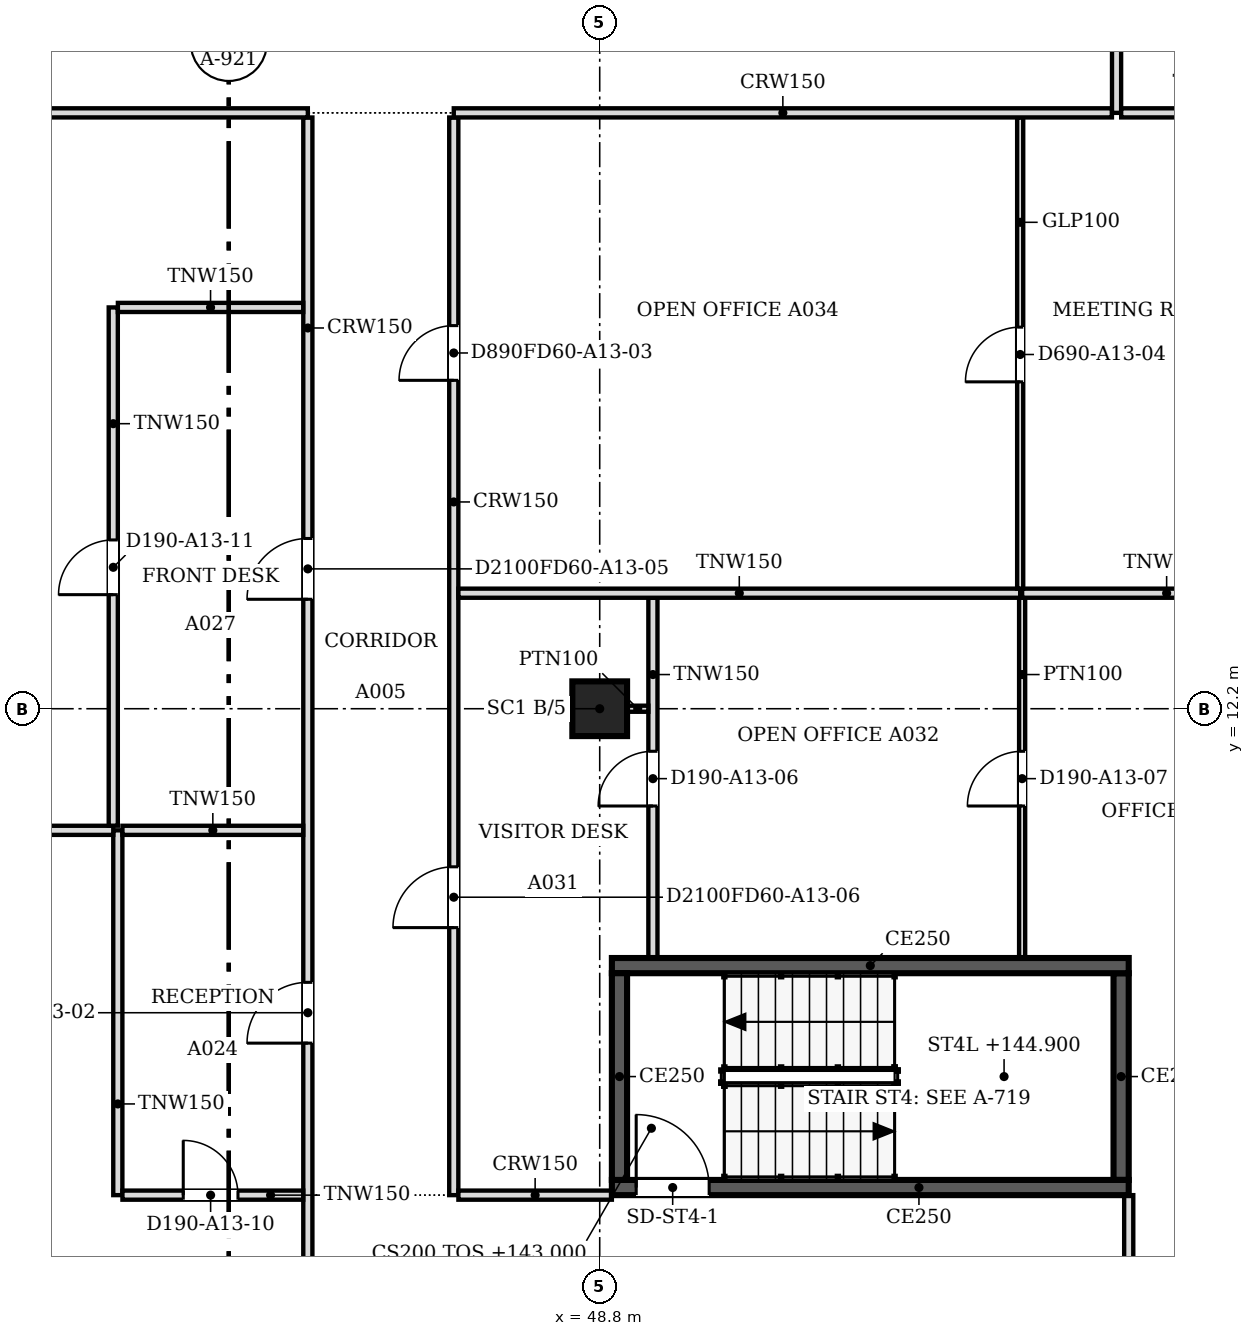
"""IFC4 building model, lengths in metres.
Left out: names, types, materials, properties, quantities, classifications, styles, units other than length and angle.
Written with IfcOpenShell. Run it as: python <this file> out.ifc"""

import sys

from ifc_helpers import new_model, si_unit, direction, frame, frame_2d, origin, origin_2d, place, context, subcontext, project, spatial, polyline, rectangle, outline, extrude, faceted_brep, source, transform, mapped, element, fill, save


model = new_model("IFC4")
c1 = context("Model", 3, precision=1e-05, world=origin(), true_north=direction((0.0, 1.0)))
c2 = subcontext(c1, "Body", "Model", "MODEL_VIEW")
j1 = project(units=[si_unit("LENGTHUNIT", "METRE"), si_unit("PLANEANGLEUNIT", "RADIAN")], contexts=[c1])
p1 = place(None, origin())
s1 = spatial("IfcSite", under=j1, at=p1, CompositionType="ELEMENT")
p2 = place(p1, origin())
s2 = spatial("IfcBuilding", under=s1, at=p2, CompositionType="ELEMENT")
p3 = place(p2, frame((0.0, 0.0, 143.0)))
s3 = spatial("IfcBuildingStorey", under=s2, at=p3, CompositionType="ELEMENT", Elevation=143.0)
p4 = place(p3, frame((48.8, 12.2, 0.0), z_axis=(0.0, 0.0, 1.0), x_axis=(1.0, 0.0, 0.0)))
e1 = element("IfcColumn", 1, at=p4, inside=s3, PredefinedType="COLUMN", context=c2, shape_type="SweptSolid", body=[
    extrude(rectangle(XDim=0.9, YDim=0.9, at=origin_2d()), origin(), (0.0, 0.0, 1.0), 3.6),
])
m1 = source(origin(), c2, "Body", "Brep", [
    faceted_brep([(2.944, -0.25, 0.0), (2.997, -0.25, 0.068), (2.997, -0.25, 7.532), (2.944, -0.25, 7.6), (0.0, -0.25, 3.8), (0.053, 0.25, 3.868), (2.891, 0.25, 7.532), (2.891, 0.25, 0.068), (0.053, 0.25, 3.732), (2.944, 0.0, 0.0), (2.944, 0.0, 7.6), (0.0, 0.0, 3.8)], [[[0, 1, 2, 3, 4]], [[5, 6, 7, 8]], [[1, 0, 9]], [[10, 3, 2]], [[6, 5, 11, 4, 3, 10]], [[8, 7, 9, 0, 4, 11]], [[8, 11, 5]], [[1, 9, 7, 6, 10, 2]]]),
])
p5 = place(p3, frame((57.606, 1.312, -3.8), z_axis=(0.0, 0.0, 1.0), x_axis=(0.707147509625, 0.707066050402, 0.0)))
e2 = element("IfcWall", 2, at=p5, inside=s3, PredefinedType="SOLIDWALL", context=c2, shape_type="MappedRepresentation", body=[
    mapped(m1, transform((0.0, 0.0, 0.0), scale=1.0)),
])
m2 = source(origin(), c2, "Body", "SweptSolid", [
    extrude(outline(polyline([(2.744, 6.934), (0.316, 3.8), (2.744, 0.666), (2.744, 6.934)])), frame((0.0, 0.26, 0.0), z_axis=(0.0, -1.0, 0.0), x_axis=(1.0, 0.0, 0.0)), (0.0, 0.0, 1.0), 0.52),
])
p6 = place(p5, origin())
e3 = element("IfcOpeningElement", 3, at=p6, cuts=e2, PredefinedType="OPENING", context=c2, shape_type="MappedRepresentation", body=[
    mapped(m2, transform((0.0, 0.0, 0.0), scale=1.0)),
])
p7 = place(p2, frame((0.0, 0.0, 146.8)))
s4 = spatial("IfcBuildingStorey", under=s2, at=p7, CompositionType="ELEMENT", Elevation=146.8)
m3 = source(origin(), c2, "Body", "Brep", [
    faceted_brep([(0.053, -0.25, 0.0), (2.997, -0.25, 3.8), (0.053, -0.25, 7.6), (0.0, -0.25, 7.532), (0.0, -0.25, 0.068), (0.106, 0.25, 7.532), (2.944, 0.25, 3.868), (2.944, 0.25, 3.732), (0.106, 0.25, 0.068), (2.997, 0.0, 3.8), (0.053, 0.0, 0.0), (0.053, 0.0, 7.6)], [[[0, 1, 2, 3, 4]], [[5, 6, 7, 8]], [[8, 7, 9, 1, 0, 10]], [[6, 5, 11, 2, 1, 9]], [[3, 2, 11]], [[10, 0, 4]], [[8, 10, 4, 3, 11, 5]], [[9, 7, 6]]]),
])
p8 = place(p7, frame((57.569, 1.274, -3.8), z_axis=(0.0, 0.0, 1.0), x_axis=(0.707066050402, 0.707147509625, 0.0)))
e4 = element("IfcWall", 4, at=p8, inside=s4, PredefinedType="SOLIDWALL", context=c2, shape_type="MappedRepresentation", body=[
    mapped(m3, transform((0.0, 0.0, 0.0), scale=1.0)),
])
m4 = source(origin(), c2, "Body", "SweptSolid", [
    extrude(outline(polyline([(0.253, 0.666), (2.681, 3.8), (0.253, 6.934), (0.253, 0.666)])), frame((0.0, 0.26, 0.0), z_axis=(0.0, -1.0, 0.0), x_axis=(1.0, 0.0, 0.0)), (0.0, 0.0, 1.0), 0.52),
])
p9 = place(p8, origin())
e5 = element("IfcOpeningElement", 5, at=p9, cuts=e4, PredefinedType="OPENING", context=c2, shape_type="MappedRepresentation", body=[
    mapped(m4, transform((0.0, 0.0, 0.0), scale=1.0)),
])
p10 = place(p3, frame((57.5, 4.325, 0.0), z_axis=(0.0, 0.0, 1.0), x_axis=(-1.0, 0.0, 0.0)))
e6 = element("IfcWall", 6, at=p10, inside=s3, PredefinedType="SOLIDWALL", context=c2, shape_type="SweptSolid", body=[
    extrude(rectangle(XDim=8.5, YDim=0.25, at=frame_2d((4.25, 0.0))), origin(), (0.0, 0.0, 1.0), 3.8),
])
m5 = source(origin(), c2, "Body", "SweptSolid", [
    extrude(rectangle(XDim=1.2, YDim=2.1, at=frame_2d((0.6, 1.05))), frame((0.0, 0.135, 0.0), z_axis=(0.0, -1.0, 0.0), x_axis=(1.0, 0.0, 0.0)), (0.0, 0.0, 1.0), 0.27),
])
p11 = place(p10, frame((6.9, 0.0, 0.0)))
e7 = element("IfcOpeningElement", 7, at=p11, cuts=e6, PredefinedType="OPENING", context=c2, shape_type="MappedRepresentation", body=[
    mapped(m5, transform((0.0, 0.0, 0.0), scale=1.0)),
])
p12 = place(p3, frame((49.125, 4.45, 0.0), z_axis=(0.0, 0.0, 1.0), x_axis=(0.0, 1.0, 0.0)))
e8 = element("IfcWall", 8, at=p12, inside=s3, PredefinedType="SOLIDWALL", context=c2, shape_type="SweptSolid", body=[
    extrude(rectangle(XDim=3.4, YDim=0.25, at=frame_2d((1.7, 0.0))), origin(), (0.0, 0.0, 1.0), 3.8),
])
p13 = place(p3, frame((49.0, 7.975, 0.0), z_axis=(0.0, 0.0, 1.0), x_axis=(1.0, 0.0, 0.0)))
e9 = element("IfcWall", 9, at=p13, inside=s3, PredefinedType="SOLIDWALL", context=c2, shape_type="SweptSolid", body=[
    extrude(rectangle(XDim=8.5, YDim=0.25, at=frame_2d((4.25, 0.0))), origin(), (0.0, 0.0, 1.0), 3.8),
])
p14 = place(p3, frame((57.375, 7.85, 0.0), z_axis=(0.0, 0.0, 1.0), x_axis=(0.0, -1.0, 0.0)))
e10 = element("IfcWall", 10, at=p14, inside=s3, PredefinedType="SOLIDWALL", context=c2, shape_type="SweptSolid", body=[
    extrude(rectangle(XDim=3.4, YDim=0.25, at=frame_2d((1.7, 0.0))), origin(), (0.0, 0.0, 1.0), 3.8),
])
p15 = place(p3, frame((44.0, 0.5, 0.0), z_axis=(0.0, 0.0, 1.0), x_axis=(0.0, 1.0, 0.0)))
e11 = element("IfcWall", 11, at=p15, inside=s3, PredefinedType="PARTITIONING", context=c2, shape_type="SweptSolid", body=[
    extrude(rectangle(XDim=21.424, YDim=0.15, at=frame_2d((10.712, 0.0))), origin(), (0.0, 0.0, 1.0), 3.067),
])
m6 = source(origin(), c2, "Body", "SweptSolid", [
    extrude(rectangle(XDim=1.0, YDim=2.1, at=frame_2d((0.5, 1.05))), frame((0.0, 0.085, 0.0), z_axis=(0.0, -1.0, 0.0), x_axis=(1.0, 0.0, 0.0)), (0.0, 0.0, 1.0), 0.17),
])
p16 = place(p15, frame((6.2, 0.0, 0.0)))
e12 = element("IfcOpeningElement", 12, at=p16, cuts=e11, PredefinedType="OPENING", context=c2, shape_type="MappedRepresentation", body=[
    mapped(m6, transform((0.0, 0.0, 0.0), scale=1.0)),
])
p17 = place(p15, frame((13.5, 0.0, 0.0)))
e13 = element("IfcOpeningElement", 13, at=p17, cuts=e11, PredefinedType="OPENING", context=c2, shape_type="MappedRepresentation", body=[
    mapped(m6, transform((0.0, 0.0, 0.0), scale=1.0)),
])
p18 = place(p3, frame((57.5, 1.559, 0.0), z_axis=(0.0, 0.0, 1.0), x_axis=(0.0, 1.0, 0.0)))
e14 = element("IfcWall", 14, at=p18, inside=s3, PredefinedType="PARTITIONING", context=c2, shape_type="SweptSolid", body=[
    extrude(rectangle(XDim=2.641, YDim=0.15, at=frame_2d((1.32, 0.0))), origin(), (0.0, 0.0, 1.0), 3.067),
])
p19 = place(p3, frame((40.875, 4.2, 0.0), z_axis=(0.0, 0.0, 1.0), x_axis=(0.0, 1.0, 0.0)))
e15 = element("IfcWall", 15, at=p19, inside=s3, PredefinedType="PARTITIONING", context=c2, shape_type="SweptSolid", body=[
    extrude(rectangle(XDim=6.0, YDim=0.15, at=frame_2d((3.0, 0.0))), origin(), (0.0, 0.0, 1.0), 3.067),
])
p20 = place(p3, frame((43.924, 4.2, 0.0), z_axis=(0.0, 0.0, 1.0), x_axis=(-1.0, 0.0, 0.0)))
e16 = element("IfcWall", 16, at=p20, inside=s3, PredefinedType="PARTITIONING", context=c2, shape_type="SweptSolid", body=[
    extrude(rectangle(XDim=2.973, YDim=0.15, at=frame_2d((1.487, 0.0))), origin(), (0.0, 0.0, 1.0), 3.067),
])
m7 = source(origin(), c2, "Body", "SweptSolid", [
    extrude(rectangle(XDim=0.9, YDim=2.1, at=frame_2d((0.45, 1.05))), frame((0.0, 0.085, 0.0), z_axis=(0.0, -1.0, 0.0), x_axis=(1.0, 0.0, 0.0)), (0.0, 0.0, 1.0), 0.17),
])
p21 = place(p20, frame((1.073, 0.0, 0.0)))
e17 = element("IfcOpeningElement", 17, at=p21, cuts=e16, PredefinedType="OPENING", context=c2, shape_type="MappedRepresentation", body=[
    mapped(m7, transform((0.0, 0.0, 0.0), scale=1.0)),
])
p22 = place(p3, frame((46.4, 21.924, 0.0), z_axis=(0.0, 0.0, 1.0), x_axis=(0.0, -1.0, 0.0)))
e18 = element("IfcWall", 18, at=p22, inside=s3, PredefinedType="PARTITIONING", context=c2, shape_type="SweptSolid", body=[
    extrude(rectangle(XDim=17.724, YDim=0.15, at=frame_2d((8.862, 0.0))), origin(), (0.0, 0.0, 1.0), 3.067),
])
p23 = place(p22, frame((3.423, 0.0, 0.0)))
e19 = element("IfcOpeningElement", 19, at=p23, cuts=e18, PredefinedType="OPENING", context=c2, shape_type="MappedRepresentation", body=[
    mapped(m7, transform((0.0, 0.0, 0.0), scale=1.0)),
])
p24 = place(p22, frame((12.324, 0.0, 0.0)))
e20 = element("IfcOpeningElement", 20, at=p24, cuts=e18, PredefinedType="OPENING", context=c2, shape_type="MappedRepresentation", body=[
    mapped(m6, transform((0.0, 0.0, 0.0), scale=1.0)),
])
p25 = place(p3, frame((46.476, 4.2, 0.0), z_axis=(0.0, 0.0, 1.0), x_axis=(1.0, 0.0, 0.0)))
e21 = element("IfcWall", 21, at=p25, inside=s3, PredefinedType="PARTITIONING", context=c2, shape_type="SweptSolid", body=[
    extrude(rectangle(XDim=2.524, YDim=0.15, at=frame_2d((1.262, 0.0))), origin(), (0.0, 0.0, 1.0), 3.067),
])
p26 = place(p3, frame((49.675, 14.024, 0.0), z_axis=(0.0, 0.0, 1.0), x_axis=(0.0, -1.0, 0.0)))
e22 = element("IfcWall", 22, at=p26, inside=s3, PredefinedType="PARTITIONING", context=c2, shape_type="SweptSolid", body=[
    extrude(rectangle(XDim=5.924, YDim=0.15, at=frame_2d((2.962, 0.0))), origin(), (0.0, 0.0, 1.0), 3.067),
])
p27 = place(p26, frame((2.524, 0.0, 0.0)))
e23 = element("IfcOpeningElement", 23, at=p27, cuts=e22, PredefinedType="OPENING", context=c2, shape_type="MappedRepresentation", body=[
    mapped(m7, transform((0.0, 0.0, 0.0), scale=1.0)),
])
p28 = place(p3, frame((55.747, 14.024, 0.0), z_axis=(0.0, 0.0, 1.0), x_axis=(0.0, -1.0, 0.0)))
e24 = element("IfcWall", 24, at=p28, inside=s3, PredefinedType="PARTITIONING", context=c2, shape_type="SweptSolid", body=[
    extrude(rectangle(XDim=5.924, YDim=0.1, at=frame_2d((2.962, 0.0))), origin(), (0.0, 0.0, 1.0), 3.067),
])
m8 = source(origin(), c2, "Body", "SweptSolid", [
    extrude(rectangle(XDim=0.9, YDim=2.1, at=frame_2d((0.45, 1.05))), frame((0.0, 0.06, 0.0), z_axis=(0.0, -1.0, 0.0), x_axis=(1.0, 0.0, 0.0)), (0.0, 0.0, 1.0), 0.12),
])
p29 = place(p28, frame((2.524, 0.0, 0.0)))
e25 = element("IfcOpeningElement", 25, at=p29, cuts=e24, PredefinedType="OPENING", context=c2, shape_type="MappedRepresentation", body=[
    mapped(m8, transform((0.0, 0.0, 0.0), scale=1.0)),
])
p30 = place(p3, frame((24.9, 10.2, 0.0), z_axis=(0.0, 0.0, 1.0), x_axis=(1.0, 0.0, 0.0)))
e26 = element("IfcWall", 26, at=p30, inside=s3, PredefinedType="PARTITIONING", context=c2, shape_type="SweptSolid", body=[
    extrude(rectangle(XDim=15.9, YDim=0.15, at=frame_2d((7.95, 0.0))), origin(), (0.0, 0.0, 1.0), 3.067),
])
p31 = place(p3, frame((40.951, 10.2, 0.0), z_axis=(0.0, 0.0, 1.0), x_axis=(1.0, 0.0, 0.0)))
e27 = element("IfcWall", 27, at=p31, inside=s3, PredefinedType="PARTITIONING", context=c2, shape_type="SweptSolid", body=[
    extrude(rectangle(XDim=2.973, YDim=0.15, at=frame_2d((1.487, 0.0))), origin(), (0.0, 0.0, 1.0), 3.067),
])
p32 = place(p3, frame((40.8, 10.276, 0.0), z_axis=(0.0, 0.0, 1.0), x_axis=(0.0, 1.0, 0.0)))
e28 = element("IfcWall", 28, at=p32, inside=s3, PredefinedType="PARTITIONING", context=c2, shape_type="SweptSolid", body=[
    extrude(rectangle(XDim=8.524, YDim=0.15, at=frame_2d((4.262, 0.0))), origin(), (0.0, 0.0, 1.0), 3.067),
])
p33 = place(p32, frame((3.8, 0.0, 0.0)))
e29 = element("IfcOpeningElement", 29, at=p33, cuts=e28, PredefinedType="OPENING", context=c2, shape_type="MappedRepresentation", body=[
    mapped(m7, transform((0.0, 0.0, 0.0), scale=1.0)),
])
p34 = place(p3, frame((49.25, 12.2, 0.0), z_axis=(0.0, 0.0, 1.0), x_axis=(1.0, 0.0, 0.0)))
e30 = element("IfcWall", 30, at=p34, inside=s3, PredefinedType="PARTITIONING", context=c2, shape_type="SweptSolid", body=[
    extrude(rectangle(XDim=0.35, YDim=0.1, at=frame_2d((0.175, 0.0))), origin(), (0.0, 0.0, 1.0), 3.067),
])
p35 = place(p3, frame((46.476, 14.1, 0.0), z_axis=(0.0, 0.0, 1.0), x_axis=(1.0, 0.0, 0.0)))
e31 = element("IfcWall", 31, at=p35, inside=s3, PredefinedType="PARTITIONING", context=c2, shape_type="SweptSolid", body=[
    extrude(rectangle(XDim=9.239, YDim=0.15, at=frame_2d((4.62, 0.0))), origin(), (0.0, 0.0, 1.0), 3.067),
])
p36 = place(p3, frame((55.747, 14.1, 0.0), z_axis=(0.0, 0.0, 1.0), x_axis=(1.0, 0.0, 0.0)))
e32 = element("IfcWall", 32, at=p36, inside=s3, PredefinedType="PARTITIONING", context=c2, shape_type="SweptSolid", body=[
    extrude(rectangle(XDim=4.753, YDim=0.15, at=frame_2d((2.376, 0.0))), origin(), (0.0, 0.0, 1.0), 3.067),
])
p37 = place(p3, frame((55.715, 21.924, 0.0), z_axis=(0.0, 0.0, 1.0), x_axis=(0.0, -1.0, 0.0)))
e33 = element("IfcWall", 33, at=p37, inside=s3, PredefinedType="PARTITIONING", context=c2, shape_type="SweptSolid", body=[
    extrude(rectangle(XDim=7.748, YDim=0.1, at=frame_2d((3.874, 0.0))), origin(), (0.0, 0.0, 1.0), 3.067),
])
p38 = place(p37, frame((3.448, 0.0, 0.0)))
e34 = element("IfcOpeningElement", 34, at=p38, cuts=e33, PredefinedType="OPENING", context=c2, shape_type="MappedRepresentation", body=[
    mapped(m8, transform((0.0, 0.0, 0.0), scale=1.0)),
])
p39 = place(p3, frame((40.876, 18.8, 0.0), z_axis=(0.0, 0.0, 1.0), x_axis=(1.0, 0.0, 0.0)))
e35 = element("IfcWall", 35, at=p39, inside=s3, PredefinedType="PARTITIONING", context=c2, shape_type="SweptSolid", body=[
    extrude(rectangle(XDim=3.048, YDim=0.15, at=frame_2d((1.524, 0.0))), origin(), (0.0, 0.0, 1.0), 3.067),
])
p40 = place(p3, frame((30.5, 22.0, 0.0), z_axis=(0.0, 0.0, 1.0), x_axis=(1.0, 0.0, 0.0)))
e36 = element("IfcWall", 36, at=p40, inside=s3, PredefinedType="PARTITIONING", context=c2, shape_type="SweptSolid", body=[
    extrude(rectangle(XDim=13.5, YDim=0.15, at=frame_2d((6.75, 0.0))), origin(), (0.0, 0.0, 1.0), 3.067),
])
p41 = place(p3, frame((46.4, 22.0, 0.0), z_axis=(0.0, 0.0, 1.0), x_axis=(1.0, 0.0, 0.0)))
e37 = element("IfcWall", 37, at=p41, inside=s3, PredefinedType="PARTITIONING", context=c2, shape_type="SweptSolid", body=[
    extrude(rectangle(XDim=10.824, YDim=0.15, at=frame_2d((5.412, 0.0))), origin(), (0.0, 0.0, 1.0), 3.067),
])
p42 = place(p3, frame((57.3, 30.6, 0.0), z_axis=(0.0, 0.0, 1.0), x_axis=(0.0, -1.0, 0.0)))
e38 = element("IfcWall", 38, at=p42, inside=s3, PredefinedType="PARTITIONING", context=c2, shape_type="SweptSolid", body=[
    extrude(rectangle(XDim=8.6, YDim=0.15, at=frame_2d((4.3, 0.0))), origin(), (0.0, 0.0, 1.0), 3.067),
])
p43 = place(p42, frame((3.9, 0.0, 0.0)))
e39 = element("IfcOpeningElement", 39, at=p43, cuts=e38, PredefinedType="OPENING", context=c2, shape_type="MappedRepresentation", body=[
    mapped(m7, transform((0.0, 0.0, 0.0), scale=1.0)),
])
p44 = place(p3, frame((57.376, 22.0, 0.0), z_axis=(0.0, 0.0, 1.0), x_axis=(1.0, 0.0, 0.0)))
e40 = element("IfcWall", 40, at=p44, inside=s3, PredefinedType="PARTITIONING", context=c2, shape_type="SweptSolid", body=[
    extrude(rectangle(XDim=3.124, YDim=0.15, at=frame_2d((1.562, 0.0))), origin(), (0.0, 0.0, 1.0), 3.067),
])
m9 = source(origin(), c2, "Body", "SweptSolid", [
    extrude(rectangle(XDim=1.2, YDim=2.1, at=frame_2d((0.6, 1.05))), frame((0.0, 0.025, 0.0), z_axis=(0.0, -1.0, 0.0), x_axis=(1.0, 0.0, 0.0)), (0.0, 0.0, 1.0), 0.05),
])
p45 = place(p11, origin())
e41 = element("IfcDoor", 41, at=p45, inside=s3, OperationType="SINGLE_SWING_RIGHT", PredefinedType="DOOR", context=c2, shape_type="MappedRepresentation", body=[
    mapped(m9, transform((0.0, 0.0, 0.0), scale=1.0)),
])
fill(e7, e41)
m10 = source(origin(), c2, "Body", "SweptSolid", [
    extrude(rectangle(XDim=0.9, YDim=2.1, at=frame_2d((0.45, 1.05))), frame((0.0, 0.025, 0.0), z_axis=(0.0, -1.0, 0.0), x_axis=(1.0, 0.0, 0.0)), (0.0, 0.0, 1.0), 0.05),
])
p46 = place(p27, origin())
e42 = element("IfcDoor", 42, at=p46, inside=s3, OperationType="SINGLE_SWING_RIGHT", PredefinedType="DOOR", context=c2, shape_type="MappedRepresentation", body=[
    mapped(m10, transform((0.0, 0.0, 0.0), scale=1.0)),
])
fill(e23, e42)
p47 = place(p29, origin())
e43 = element("IfcDoor", 43, at=p47, inside=s3, OperationType="SINGLE_SWING_RIGHT", PredefinedType="DOOR", context=c2, shape_type="MappedRepresentation", body=[
    mapped(m10, transform((0.0, 0.0, 0.0), scale=1.0)),
])
fill(e25, e43)
m11 = source(origin(), c2, "Body", "SweptSolid", [
    extrude(rectangle(XDim=1.0, YDim=2.1, at=frame_2d((0.5, 1.05))), frame((0.0, 0.025, 0.0), z_axis=(0.0, -1.0, 0.0), x_axis=(1.0, 0.0, 0.0)), (0.0, 0.0, 1.0), 0.05),
])
p48 = place(p16, origin())
e44 = element("IfcDoor", 44, at=p48, inside=s3, OperationType="SINGLE_SWING_LEFT", PredefinedType="DOOR", context=c2, shape_type="MappedRepresentation", body=[
    mapped(m11, transform((0.0, 0.0, 0.0), scale=1.0)),
])
fill(e12, e44)
p49 = place(p38, origin())
e45 = element("IfcDoor", 45, at=p49, inside=s3, OperationType="SINGLE_SWING_RIGHT", PredefinedType="DOOR", context=c2, shape_type="MappedRepresentation", body=[
    mapped(m10, transform((0.0, 0.0, 0.0), scale=1.0)),
])
fill(e34, e45)
p50 = place(p23, origin())
e46 = element("IfcDoor", 46, at=p50, inside=s3, OperationType="SINGLE_SWING_RIGHT", PredefinedType="DOOR", context=c2, shape_type="MappedRepresentation", body=[
    mapped(m10, transform((0.0, 0.0, 0.0), scale=1.0)),
])
fill(e19, e46)
p51 = place(p17, origin())
e47 = element("IfcDoor", 47, at=p51, inside=s3, OperationType="SINGLE_SWING_LEFT", PredefinedType="DOOR", context=c2, shape_type="MappedRepresentation", body=[
    mapped(m11, transform((0.0, 0.0, 0.0), scale=1.0)),
])
fill(e13, e47)
p52 = place(p21, origin())
e48 = element("IfcDoor", 48, at=p52, inside=s3, OperationType="SINGLE_SWING_RIGHT", PredefinedType="DOOR", context=c2, shape_type="MappedRepresentation", body=[
    mapped(m10, transform((0.0, 0.0, 0.0), scale=1.0)),
])
fill(e17, e48)
p53 = place(p24, origin())
e49 = element("IfcDoor", 49, at=p53, inside=s3, OperationType="SINGLE_SWING_RIGHT", PredefinedType="DOOR", context=c2, shape_type="MappedRepresentation", body=[
    mapped(m11, transform((0.0, 0.0, 0.0), scale=1.0)),
])
fill(e20, e49)
p54 = place(p33, origin())
e50 = element("IfcDoor", 50, at=p54, inside=s3, OperationType="SINGLE_SWING_LEFT", PredefinedType="DOOR", context=c2, shape_type="MappedRepresentation", body=[
    mapped(m10, transform((0.0, 0.0, 0.0), scale=1.0)),
])
fill(e29, e50)
save(model, sys.argv[1])
